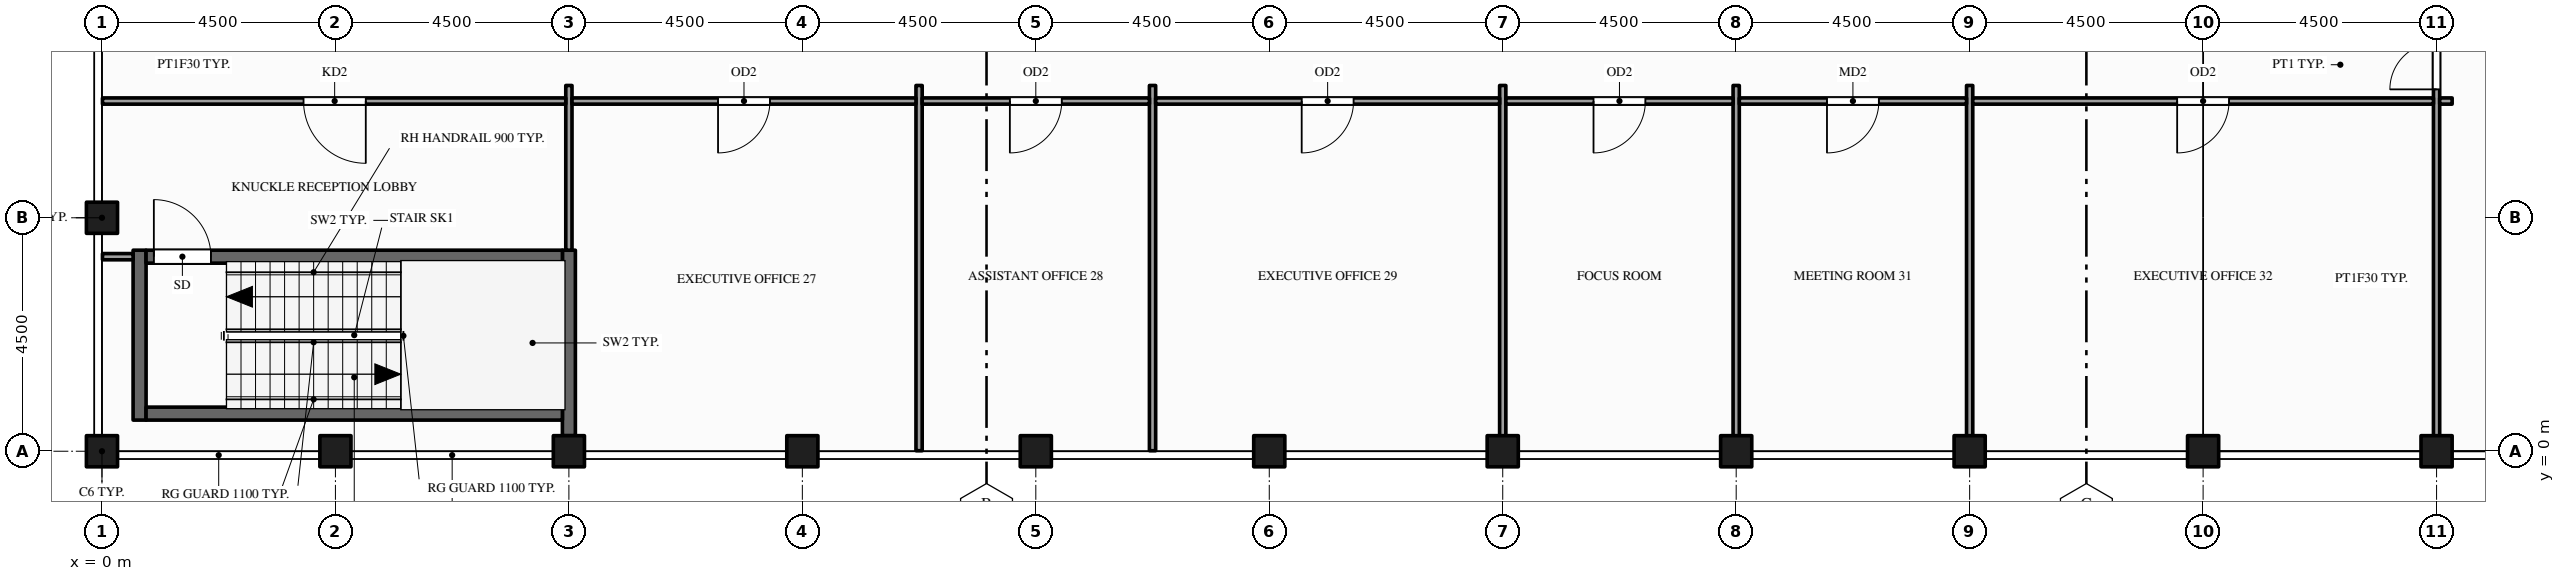
"""IFC4 building model, lengths in metres.
Left out: names, types, materials, properties, quantities, classifications, styles, units other than length and angle.
Written with IfcOpenShell. Run it as: python <this file> out.ifc"""

import sys

from ifc_helpers import new_model, si_unit, direction, frame, frame_2d, origin, origin_2d, place, context, subcontext, project, spatial, rectangle, hollow_rectangle, extrude, element, fill, save


model = new_model("IFC4")
c1 = context("Model", 3, precision=1e-05, world=origin(), true_north=direction((0.0, 1.0)))
c2 = subcontext(c1, "Body", "Model", "MODEL_VIEW")
j1 = project(units=[si_unit("LENGTHUNIT", "METRE"), si_unit("PLANEANGLEUNIT", "RADIAN")], contexts=[c1])
p1 = place(None, origin())
s1 = spatial("IfcSite", under=j1, at=p1, CompositionType="ELEMENT")
p2 = place(p1, origin())
s2 = spatial("IfcBuilding", under=s1, at=p2, CompositionType="ELEMENT")
p3 = place(p2, frame((0.0, 0.0, 341.0)))
s3 = spatial("IfcBuildingStorey", under=s2, at=p3, CompositionType="ELEMENT", Elevation=341.0)
for number, where, z_axis, x_axis in (
    (1, (0.0, 0.0, -0.15), (0.0, 0.0, 1.0), (1.0, 0.0, 0.0)),
    (2, (0.0, 4.5, -0.15), (0.0, 0.0, 1.0), (1.0, 0.0, 0.0)),
    (3, (4.5, 0.0, -0.15), (0.0, 0.0, 1.0), (1.0, 0.0, 0.0)),
    (4, (9.0, 0.0, -0.15), (0.0, 0.0, 1.0), (1.0, 0.0, 0.0)),
    (5, (13.5, 0.0, -0.15), (0.0, 0.0, 1.0), (1.0, 0.0, 0.0)),
    (6, (18.0, 0.0, -0.15), (0.0, 0.0, 1.0), (1.0, 0.0, 0.0)),
    (7, (22.5, 0.0, -0.15), (0.0, 0.0, 1.0), (1.0, 0.0, 0.0)),
    (8, (27.0, 0.0, -0.15), (0.0, 0.0, 1.0), (1.0, 0.0, 0.0)),
    (9, (31.5, 0.0, -0.15), (0.0, 0.0, 1.0), (1.0, 0.0, 0.0)),
    (10, (36.0, 0.0, -0.15), (0.0, 0.0, 1.0), (1.0, 0.0, 0.0)),
    (11, (40.5, 0.0, -0.15), (0.0, 0.0, 1.0), (1.0, 0.0, 0.0)),
):
    element("IfcColumn", number, at=place(p3, frame(where, z_axis=z_axis, x_axis=x_axis)), inside=s3, PredefinedType="COLUMN", context=c2, shape_type="SweptSolid", body=[
        extrude(hollow_rectangle(XDim=0.6, YDim=0.6, WallThickness=0.03, at=origin_2d()), origin(), (0.0, 0.0, 1.0), 4.4),
    ])
p4 = place(p3, frame((45.0, 0.0, -0.15), z_axis=(0.0, 0.0, 1.0), x_axis=(1.0, 0.0, 0.0)))
e12 = element("IfcColumn", 12, at=p4, inside=s3, PredefinedType="COLUMN", context=c2, shape_type="SweptSolid", body=[
    extrude(hollow_rectangle(XDim=0.6, YDim=0.6, WallThickness=0.03, at=origin_2d()), origin(), (0.0, 0.0, 1.0), 4.45),
])
p5 = place(p3, frame((0.725, 0.6, 0.0), z_axis=(0.0, 0.0, 1.0), x_axis=(0.0, 1.0, 0.0)))
e13 = element("IfcWall", 13, at=p5, inside=s3, PredefinedType="SHEAR", context=c2, shape_type="SweptSolid", body=[
    extrude(rectangle(XDim=3.275, YDim=0.25, at=frame_2d((1.637, 0.0))), origin(), (0.0, 0.0, 1.0), 4.25),
])
p6 = place(p3, frame((9.0, 0.3, 0.0), z_axis=(0.0, 0.0, 1.0), x_axis=(0.0, 1.0, 0.0)))
e14 = element("IfcWall", 14, at=p6, inside=s3, PredefinedType="SHEAR", context=c2, shape_type="SweptSolid", body=[
    extrude(rectangle(XDim=3.575, YDim=0.25, at=frame_2d((1.788, 0.0))), origin(), (0.0, 0.0, 1.0), 4.25),
])
p7 = place(p3, frame((9.0, 3.875, 0.0), z_axis=(0.0, 0.0, 1.0), x_axis=(0.0, 1.0, 0.0)))
e15 = element("IfcWall", 15, at=p7, inside=s3, PredefinedType="PARTITIONING", context=c2, shape_type="SweptSolid", body=[
    extrude(rectangle(XDim=3.175, YDim=0.12, at=frame_2d((1.587, 0.0))), origin(), (0.0, 0.0, 1.0), 3.259),
])
for number, where, z_axis, x_axis in (
    (16, (15.75, 0.01, 0.0), (0.0, 0.0, 1.0), (0.0, 1.0, 0.0)),
    (17, (20.25, 0.01, 0.0), (0.0, 0.0, 1.0), (0.0, 1.0, 0.0)),
    (18, (27.0, 0.01, 0.0), (0.0, 0.0, 1.0), (0.0, 1.0, 0.0)),
    (19, (31.5, 0.01, 0.0), (0.0, 0.0, 1.0), (0.0, 1.0, 0.0)),
    (20, (36.0, 0.01, 0.0), (0.0, 0.0, 1.0), (0.0, 1.0, 0.0)),
):
    element("IfcWall", number, at=place(p3, frame(where, z_axis=z_axis, x_axis=x_axis)), inside=s3, PredefinedType="PARTITIONING", context=c2, shape_type="SweptSolid", body=[
        extrude(rectangle(XDim=7.04, YDim=0.12, at=frame_2d((3.52, 0.0))), origin(), (0.0, 0.0, 1.0), 3.259),
    ])
p8 = place(p3, frame((45.0, 0.01, 0.0), z_axis=(0.0, 0.0, 1.0), x_axis=(0.0, 1.0, 0.0)))
e21 = element("IfcWall", 21, at=p8, inside=s3, PredefinedType="PARTITIONING", context=c2, shape_type="SweptSolid", body=[
    extrude(rectangle(XDim=22.48, YDim=0.12, at=frame_2d((11.24, 0.0))), origin(), (0.0, 0.0, 1.0), 3.309),
])
p9 = place(p8, frame((6.965, 0.0, 0.0)))
e22 = element("IfcOpeningElement", 22, at=p9, cuts=e21, PredefinedType="OPENING", context=c2, shape_type="SweptSolid", body=[
    extrude(rectangle(XDim=1.8, YDim=2.1, at=frame_2d((0.9, 1.05))), frame((0.0, 0.07, 0.0), z_axis=(0.0, -1.0, 0.0), x_axis=(1.0, 0.0, 0.0)), (0.0, 0.0, 1.0), 0.14),
])
p10 = place(p8, frame((9.99, 0.0, 0.0)))
e23 = element("IfcOpeningElement", 23, at=p10, cuts=e21, PredefinedType="OPENING", context=c2, shape_type="SweptSolid", body=[
    extrude(rectangle(XDim=0.9, YDim=2.1, at=frame_2d((0.45, 1.05))), frame((0.0, 0.07, 0.0), z_axis=(0.0, -1.0, 0.0), x_axis=(1.0, 0.0, 0.0)), (0.0, 0.0, 1.0), 0.14),
])
p11 = place(p8, frame((15.29, 0.0, 0.0)))
e24 = element("IfcOpeningElement", 24, at=p11, cuts=e21, PredefinedType="OPENING", context=c2, shape_type="SweptSolid", body=[
    extrude(rectangle(XDim=0.9, YDim=2.1, at=frame_2d((0.45, 1.05))), frame((0.0, 0.07, 0.0), z_axis=(0.0, -1.0, 0.0), x_axis=(1.0, 0.0, 0.0)), (0.0, 0.0, 1.0), 0.14),
])
p12 = place(p8, frame((20.49, 0.0, 0.0)))
e25 = element("IfcOpeningElement", 25, at=p12, cuts=e21, PredefinedType="OPENING", context=c2, shape_type="SweptSolid", body=[
    extrude(rectangle(XDim=1.0, YDim=2.1, at=frame_2d((0.5, 1.05))), frame((0.0, 0.07, 0.0), z_axis=(0.0, -1.0, 0.0), x_axis=(1.0, 0.0, 0.0)), (0.0, 0.0, 1.0), 0.14),
])
p13 = place(p3, frame((0.85, 0.725, 0.0), z_axis=(0.0, 0.0, 1.0), x_axis=(1.0, 0.0, 0.0)))
e26 = element("IfcWall", 26, at=p13, inside=s3, PredefinedType="SHEAR", context=c2, shape_type="SweptSolid", body=[
    extrude(rectangle(XDim=8.025, YDim=0.25, at=frame_2d((4.012, 0.0))), origin(), (0.0, 0.0, 1.0), 4.25),
])
p14 = place(p3, frame((0.01, 3.75, 0.0), z_axis=(0.0, 0.0, 1.0), x_axis=(1.0, 0.0, 0.0)))
e27 = element("IfcWall", 27, at=p14, inside=s3, PredefinedType="PARTITIONING", context=c2, shape_type="SweptSolid", body=[
    extrude(rectangle(XDim=0.59, YDim=0.12, at=frame_2d((0.295, 0.0))), origin(), (0.0, 0.0, 1.0), 3.572),
])
p15 = place(p3, frame((0.85, 3.75, 0.0), z_axis=(0.0, 0.0, 1.0), x_axis=(1.0, 0.0, 0.0)))
e28 = element("IfcWall", 28, at=p15, inside=s3, PredefinedType="SHEAR", context=c2, shape_type="SweptSolid", body=[
    extrude(rectangle(XDim=8.025, YDim=0.25, at=frame_2d((4.012, 0.0))), origin(), (0.0, 0.0, 1.0), 4.25),
])
p16 = place(p15, frame((0.15, 0.0, 0.0)))
e29 = element("IfcOpeningElement", 29, at=p16, cuts=e28, PredefinedType="OPENING", context=c2, shape_type="SweptSolid", body=[
    extrude(rectangle(XDim=1.1, YDim=2.1, at=frame_2d((0.55, 1.05))), frame((0.0, 0.135, 0.0), z_axis=(0.0, -1.0, 0.0), x_axis=(1.0, 0.0, 0.0)), (0.0, 0.0, 1.0), 0.27),
])
p17 = place(p3, frame((0.01, 6.75, 0.0), z_axis=(0.0, 0.0, 1.0), x_axis=(1.0, 0.0, 0.0)))
e30 = element("IfcWall", 30, at=p17, inside=s3, PredefinedType="PARTITIONING", context=c2, shape_type="SweptSolid", body=[
    extrude(rectangle(XDim=8.93, YDim=0.12, at=frame_2d((4.465, 0.0))), origin(), (0.0, 0.0, 1.0), 3.259),
])
p18 = place(p17, frame((3.875, 0.0, 0.0)))
e31 = element("IfcOpeningElement", 31, at=p18, cuts=e30, PredefinedType="OPENING", context=c2, shape_type="SweptSolid", body=[
    extrude(rectangle(XDim=1.2, YDim=2.1, at=frame_2d((0.6, 1.05))), frame((0.0, 0.07, 0.0), z_axis=(0.0, -1.0, 0.0), x_axis=(1.0, 0.0, 0.0)), (0.0, 0.0, 1.0), 0.14),
])
p19 = place(p3, frame((9.06, 6.75, 0.0), z_axis=(0.0, 0.0, 1.0), x_axis=(1.0, 0.0, 0.0)))
e32 = element("IfcWall", 32, at=p19, inside=s3, PredefinedType="PARTITIONING", context=c2, shape_type="SweptSolid", body=[
    extrude(rectangle(XDim=6.63, YDim=0.12, at=frame_2d((3.315, 0.0))), origin(), (0.0, 0.0, 1.0), 3.259),
])
p20 = place(p19, frame((2.815, 0.0, 0.0)))
e33 = element("IfcOpeningElement", 33, at=p20, cuts=e32, PredefinedType="OPENING", context=c2, shape_type="SweptSolid", body=[
    extrude(rectangle(XDim=1.0, YDim=2.1, at=frame_2d((0.5, 1.05))), frame((0.0, 0.07, 0.0), z_axis=(0.0, -1.0, 0.0), x_axis=(1.0, 0.0, 0.0)), (0.0, 0.0, 1.0), 0.14),
])
p21 = place(p3, frame((15.81, 6.75, 0.0), z_axis=(0.0, 0.0, 1.0), x_axis=(1.0, 0.0, 0.0)))
e34 = element("IfcWall", 34, at=p21, inside=s3, PredefinedType="PARTITIONING", context=c2, shape_type="SweptSolid", body=[
    extrude(rectangle(XDim=4.38, YDim=0.12, at=frame_2d((2.19, 0.0))), origin(), (0.0, 0.0, 1.0), 3.259),
])
p22 = place(p21, frame((1.69, 0.0, 0.0)))
e35 = element("IfcOpeningElement", 35, at=p22, cuts=e34, PredefinedType="OPENING", context=c2, shape_type="SweptSolid", body=[
    extrude(rectangle(XDim=1.0, YDim=2.1, at=frame_2d((0.5, 1.05))), frame((0.0, 0.07, 0.0), z_axis=(0.0, -1.0, 0.0), x_axis=(1.0, 0.0, 0.0)), (0.0, 0.0, 1.0), 0.14),
])
p23 = place(p3, frame((20.31, 6.75, 0.0), z_axis=(0.0, 0.0, 1.0), x_axis=(1.0, 0.0, 0.0)))
e36 = element("IfcWall", 36, at=p23, inside=s3, PredefinedType="PARTITIONING", context=c2, shape_type="SweptSolid", body=[
    extrude(rectangle(XDim=6.63, YDim=0.12, at=frame_2d((3.315, 0.0))), origin(), (0.0, 0.0, 1.0), 3.259),
])
p24 = place(p23, frame((2.815, 0.0, 0.0)))
e37 = element("IfcOpeningElement", 37, at=p24, cuts=e36, PredefinedType="OPENING", context=c2, shape_type="SweptSolid", body=[
    extrude(rectangle(XDim=1.0, YDim=2.1, at=frame_2d((0.5, 1.05))), frame((0.0, 0.07, 0.0), z_axis=(0.0, -1.0, 0.0), x_axis=(1.0, 0.0, 0.0)), (0.0, 0.0, 1.0), 0.14),
])
p25 = place(p3, frame((27.06, 6.75, 0.0), z_axis=(0.0, 0.0, 1.0), x_axis=(1.0, 0.0, 0.0)))
e38 = element("IfcWall", 38, at=p25, inside=s3, PredefinedType="PARTITIONING", context=c2, shape_type="SweptSolid", body=[
    extrude(rectangle(XDim=4.38, YDim=0.12, at=frame_2d((2.19, 0.0))), origin(), (0.0, 0.0, 1.0), 3.259),
])
p26 = place(p25, frame((1.69, 0.0, 0.0)))
e39 = element("IfcOpeningElement", 39, at=p26, cuts=e38, PredefinedType="OPENING", context=c2, shape_type="SweptSolid", body=[
    extrude(rectangle(XDim=1.0, YDim=2.1, at=frame_2d((0.5, 1.05))), frame((0.0, 0.07, 0.0), z_axis=(0.0, -1.0, 0.0), x_axis=(1.0, 0.0, 0.0)), (0.0, 0.0, 1.0), 0.14),
])
p27 = place(p3, frame((31.56, 6.75, 0.0), z_axis=(0.0, 0.0, 1.0), x_axis=(1.0, 0.0, 0.0)))
e40 = element("IfcWall", 40, at=p27, inside=s3, PredefinedType="PARTITIONING", context=c2, shape_type="SweptSolid", body=[
    extrude(rectangle(XDim=4.38, YDim=0.12, at=frame_2d((2.19, 0.0))), origin(), (0.0, 0.0, 1.0), 3.259),
])
p28 = place(p27, frame((1.69, 0.0, 0.0)))
e41 = element("IfcOpeningElement", 41, at=p28, cuts=e40, PredefinedType="OPENING", context=c2, shape_type="SweptSolid", body=[
    extrude(rectangle(XDim=1.0, YDim=2.1, at=frame_2d((0.5, 1.05))), frame((0.0, 0.07, 0.0), z_axis=(0.0, -1.0, 0.0), x_axis=(1.0, 0.0, 0.0)), (0.0, 0.0, 1.0), 0.14),
])
p29 = place(p3, frame((36.06, 6.75, 0.0), z_axis=(0.0, 0.0, 1.0), x_axis=(1.0, 0.0, 0.0)))
e42 = element("IfcWall", 42, at=p29, inside=s3, PredefinedType="PARTITIONING", context=c2, shape_type="SweptSolid", body=[
    extrude(rectangle(XDim=8.88, YDim=0.12, at=frame_2d((4.44, 0.0))), origin(), (0.0, 0.0, 1.0), 3.259),
])
p30 = place(p29, frame((3.94, 0.0, 0.0)))
e43 = element("IfcOpeningElement", 43, at=p30, cuts=e42, PredefinedType="OPENING", context=c2, shape_type="SweptSolid", body=[
    extrude(rectangle(XDim=1.0, YDim=2.1, at=frame_2d((0.5, 1.05))), frame((0.0, 0.07, 0.0), z_axis=(0.0, -1.0, 0.0), x_axis=(1.0, 0.0, 0.0)), (0.0, 0.0, 1.0), 0.14),
])
p31 = place(p3, frame((45.06, 6.75, 0.0), z_axis=(0.0, 0.0, 1.0), x_axis=(1.0, 0.0, 0.0)))
e44 = element("IfcWall", 44, at=p31, inside=s3, PredefinedType="PARTITIONING", context=c2, shape_type="SweptSolid", body=[
    extrude(rectangle(XDim=0.24, YDim=0.12, at=frame_2d((0.12, 0.0))), origin(), (0.0, 0.0, 1.0), 3.309),
])
p32 = place(p9, origin())
e45 = element("IfcDoor", 45, at=p32, inside=s3, OperationType="DOUBLE_DOOR_SINGLE_SWING", PredefinedType="DOOR", context=c2, shape_type="SweptSolid", body=[
    extrude(rectangle(XDim=1.8, YDim=2.1, at=frame_2d((0.9, 1.05))), frame((0.0, 0.025, 0.0), z_axis=(0.0, -1.0, 0.0), x_axis=(1.0, 0.0, 0.0)), (0.0, 0.0, 1.0), 0.05),
])
fill(e22, e45)
p33 = place(p16, origin())
e46 = element("IfcDoor", 46, at=p33, inside=s3, OperationType="SINGLE_SWING_LEFT", PredefinedType="DOOR", context=c2, shape_type="SweptSolid", body=[
    extrude(rectangle(XDim=1.1, YDim=2.1, at=frame_2d((0.55, 1.05))), frame((0.0, 0.025, 0.0), z_axis=(0.0, -1.0, 0.0), x_axis=(1.0, 0.0, 0.0)), (0.0, 0.0, 1.0), 0.05),
])
fill(e29, e46)
p34 = place(p18, origin())
e47 = element("IfcDoor", 47, at=p34, inside=s3, OperationType="SINGLE_SWING_RIGHT", PredefinedType="DOOR", context=c2, shape_type="SweptSolid", body=[
    extrude(rectangle(XDim=1.2, YDim=2.1, at=frame_2d((0.6, 1.05))), frame((0.0, 0.025, 0.0), z_axis=(0.0, -1.0, 0.0), x_axis=(1.0, 0.0, 0.0)), (0.0, 0.0, 1.0), 0.05),
])
fill(e31, e47)
p35 = place(p20, origin())
e48 = element("IfcDoor", 48, at=p35, inside=s3, OperationType="SINGLE_SWING_LEFT", PredefinedType="DOOR", context=c2, shape_type="SweptSolid", body=[
    extrude(rectangle(XDim=1.0, YDim=2.1, at=frame_2d((0.5, 1.05))), frame((0.0, 0.025, 0.0), z_axis=(0.0, -1.0, 0.0), x_axis=(1.0, 0.0, 0.0)), (0.0, 0.0, 1.0), 0.05),
])
fill(e33, e48)
p36 = place(p22, origin())
e49 = element("IfcDoor", 49, at=p36, inside=s3, OperationType="SINGLE_SWING_LEFT", PredefinedType="DOOR", context=c2, shape_type="SweptSolid", body=[
    extrude(rectangle(XDim=1.0, YDim=2.1, at=frame_2d((0.5, 1.05))), frame((0.0, 0.025, 0.0), z_axis=(0.0, -1.0, 0.0), x_axis=(1.0, 0.0, 0.0)), (0.0, 0.0, 1.0), 0.05),
])
fill(e35, e49)
p37 = place(p24, origin())
e50 = element("IfcDoor", 50, at=p37, inside=s3, OperationType="SINGLE_SWING_LEFT", PredefinedType="DOOR", context=c2, shape_type="SweptSolid", body=[
    extrude(rectangle(XDim=1.0, YDim=2.1, at=frame_2d((0.5, 1.05))), frame((0.0, 0.025, 0.0), z_axis=(0.0, -1.0, 0.0), x_axis=(1.0, 0.0, 0.0)), (0.0, 0.0, 1.0), 0.05),
])
fill(e37, e50)
p38 = place(p26, origin())
e51 = element("IfcDoor", 51, at=p38, inside=s3, OperationType="SINGLE_SWING_LEFT", PredefinedType="DOOR", context=c2, shape_type="SweptSolid", body=[
    extrude(rectangle(XDim=1.0, YDim=2.1, at=frame_2d((0.5, 1.05))), frame((0.0, 0.025, 0.0), z_axis=(0.0, -1.0, 0.0), x_axis=(1.0, 0.0, 0.0)), (0.0, 0.0, 1.0), 0.05),
])
fill(e39, e51)
p39 = place(p28, origin())
e52 = element("IfcDoor", 52, at=p39, inside=s3, OperationType="SINGLE_SWING_LEFT", PredefinedType="DOOR", context=c2, shape_type="SweptSolid", body=[
    extrude(rectangle(XDim=1.0, YDim=2.1, at=frame_2d((0.5, 1.05))), frame((0.0, 0.025, 0.0), z_axis=(0.0, -1.0, 0.0), x_axis=(1.0, 0.0, 0.0)), (0.0, 0.0, 1.0), 0.05),
])
fill(e41, e52)
p40 = place(p30, origin())
e53 = element("IfcDoor", 53, at=p40, inside=s3, OperationType="SINGLE_SWING_LEFT", PredefinedType="DOOR", context=c2, shape_type="SweptSolid", body=[
    extrude(rectangle(XDim=1.0, YDim=2.1, at=frame_2d((0.5, 1.05))), frame((0.0, 0.025, 0.0), z_axis=(0.0, -1.0, 0.0), x_axis=(1.0, 0.0, 0.0)), (0.0, 0.0, 1.0), 0.05),
])
fill(e43, e53)
save(model, sys.argv[1])
